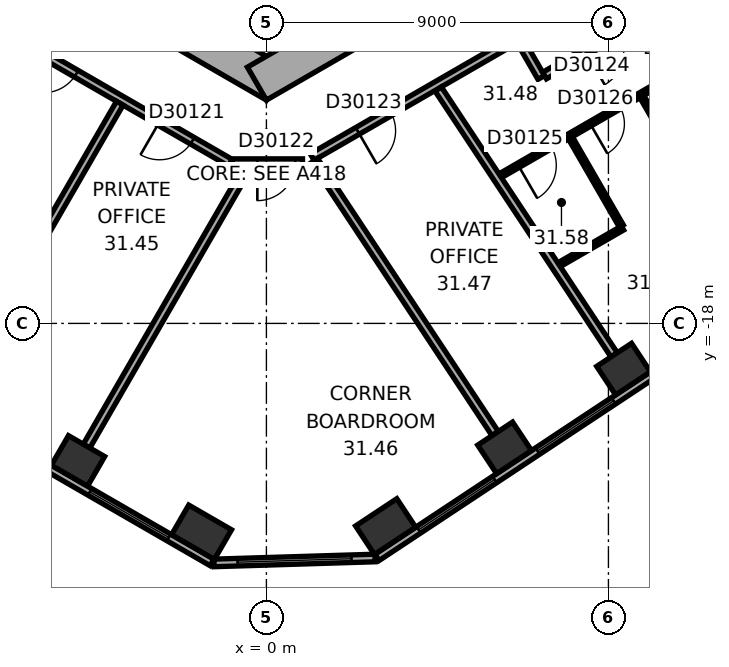
"""IFC4 building model, lengths in metres.
Left out: names, types, materials, properties, quantities, classifications, styles, units other than length and angle.
Written with IfcOpenShell. Run it as: python <this file> out.ifc"""

import sys

from ifc_helpers import new_model, si_unit, direction, frame, frame_2d, origin, origin_2d, place, context, subcontext, project, spatial, rectangle, extrude, element, fill, save


model = new_model("IFC4")
c1 = context("Model", 3, precision=1e-05, world=origin(), true_north=direction((0.0, 1.0)))
c2 = subcontext(c1, "Body", "Model", "MODEL_VIEW")
j1 = project(units=[si_unit("LENGTHUNIT", "METRE"), si_unit("PLANEANGLEUNIT", "RADIAN")], contexts=[c1])
p1 = place(None, origin())
s1 = spatial("IfcSite", under=j1, at=p1, CompositionType="ELEMENT")
p2 = place(p1, origin())
s2 = spatial("IfcBuilding", under=s1, at=p2, CompositionType="ELEMENT")
p3 = place(p2, frame((0.0, 0.0, 128.1)))
s3 = spatial("IfcBuildingStorey", under=s2, at=p3, CompositionType="ELEMENT", Elevation=128.1)
p4 = place(p3, frame((-4.958, -21.617, 0.0), z_axis=(0.0, 0.0, 1.0), x_axis=(0.866025403784, -0.5, 0.0)))
e1 = element("IfcColumn", 1, at=p4, inside=s3, PredefinedType="COLUMN", context=c2, shape_type="SweptSolid", body=[
    extrude(rectangle(XDim=1.1, YDim=0.9, at=origin_2d()), origin(), (0.0, 0.0, 1.0), 3.7),
])
for number, where, z_axis, x_axis in (
    (2, (-1.706, -23.494, 0.0), (0.0, 0.0, 1.0), (0.866, -0.5, 0.0)),
    (3, (3.137, -23.346, 0.0), (0.0, 0.0, 1.0), (0.834, 0.552, 0.0)),
):
    element("IfcColumn", number, at=place(p3, frame(where, z_axis=z_axis, x_axis=x_axis)), inside=s3, PredefinedType="COLUMN", context=c2, shape_type="SweptSolid", body=[
        extrude(rectangle(XDim=1.3, YDim=0.9, at=origin_2d()), origin(), (0.0, 0.0, 1.0), 3.7),
    ])
for number, where, z_axis, x_axis in (
    (4, (6.268, -21.274, 0.0), (0.0, 0.0, 1.0), (0.834, 0.552, 0.0)),
    (5, (9.398, -19.202, 0.0), (0.0, 0.0, 1.0), (0.834, 0.552, 0.0)),
):
    element("IfcColumn", number, at=place(p3, frame(where, z_axis=z_axis, x_axis=x_axis)), inside=s3, PredefinedType="COLUMN", context=c2, shape_type="SweptSolid", body=[
        extrude(rectangle(XDim=1.1, YDim=0.9, at=origin_2d()), origin(), (0.0, 0.0, 1.0), 3.7),
    ])
p5 = place(p3, frame((-10.25, -5.629, 0.0), z_axis=(0.0, 0.0, 1.0), x_axis=(0.866022616891, -0.50000482701, 0.0)))
e6 = element("IfcWall", 6, at=p5, inside=s3, PredefinedType="SHEAR", context=c2, shape_type="SweptSolid", body=[
    extrude(rectangle(XDim=12.125, YDim=1.0, at=frame_2d((6.062, 0.0))), origin(), (0.0, 0.0, 1.0), 3.7),
])
p6 = place(p5, frame((6.262, 0.0, 0.0)))
e7 = element("IfcOpeningElement", 7, at=p6, cuts=e6, PredefinedType="OPENING", context=c2, shape_type="SweptSolid", body=[
    extrude(rectangle(XDim=1.5, YDim=2.1, at=frame_2d((0.75, 1.05))), frame((0.0, 0.51, 0.0), z_axis=(0.0, -1.0, 0.0), x_axis=(1.0, 0.0, 0.0)), (0.0, 0.0, 1.0), 1.02),
])
p7 = place(p5, frame((1.812, 0.0, 0.0)))
e8 = element("IfcOpeningElement", 8, at=p7, cuts=e6, PredefinedType="OPENING", context=c2, shape_type="SweptSolid", body=[
    extrude(rectangle(XDim=0.9, YDim=2.1, at=frame_2d((0.45, 1.05))), frame((0.0, 0.51, 0.0), z_axis=(0.0, -1.0, 0.0), x_axis=(1.0, 0.0, 0.0)), (0.0, 0.0, 1.0), 1.02),
])
p8 = place(p5, frame((4.412, 0.0, 0.0)))
e9 = element("IfcOpeningElement", 9, at=p8, cuts=e6, PredefinedType="OPENING", context=c2, shape_type="SweptSolid", body=[
    extrude(rectangle(XDim=0.9, YDim=2.1, at=frame_2d((0.45, 1.05))), frame((0.0, 0.51, 0.0), z_axis=(0.0, -1.0, 0.0), x_axis=(1.0, 0.0, 0.0)), (0.0, 0.0, 1.0), 1.02),
])
p9 = place(p3, frame((-0.25, -11.691, 0.0), z_axis=(0.0, 0.0, 1.0), x_axis=(0.866022616891, 0.50000482701, 0.0)))
e10 = element("IfcWall", 10, at=p9, inside=s3, PredefinedType="SHEAR", context=c2, shape_type="SweptSolid", body=[
    extrude(rectangle(XDim=12.125, YDim=1.0, at=frame_2d((6.062, 0.0))), origin(), (0.0, 0.0, 1.0), 3.7),
])
p10 = place(p9, frame((4.012, 0.0, 0.0)))
e11 = element("IfcOpeningElement", 11, at=p10, cuts=e10, PredefinedType="OPENING", context=c2, shape_type="SweptSolid", body=[
    extrude(rectangle(XDim=0.9, YDim=2.1, at=frame_2d((0.45, 1.05))), frame((0.0, 0.51, 0.0), z_axis=(0.0, -1.0, 0.0), x_axis=(1.0, 0.0, 0.0)), (0.0, 0.0, 1.0), 1.02),
])
p11 = place(p9, frame((7.812, 0.0, 0.0)))
e12 = element("IfcOpeningElement", 12, at=p11, cuts=e10, PredefinedType="OPENING", context=c2, shape_type="SweptSolid", body=[
    extrude(rectangle(XDim=1.1, YDim=2.1, at=frame_2d((0.55, 1.05))), frame((0.0, 0.51, 0.0), z_axis=(0.0, -1.0, 0.0), x_axis=(1.0, 0.0, 0.0)), (0.0, 0.0, 1.0), 1.02),
])
p12 = place(p3, frame((-18.789, -14.267, 0.0), z_axis=(0.0, 0.0, 1.0), x_axis=(0.866023315909, -0.500003616288, 0.0)))
e13 = element("IfcWall", 13, at=p12, inside=s3, PredefinedType="STANDARD", context=c2, shape_type="SweptSolid", body=[
    extrude(rectangle(XDim=20.044, YDim=0.2, at=frame_2d((10.022, 0.0))), origin(), (0.0, 0.0, 1.0), 3.7),
])
p13 = place(p12, frame((1.314, 0.0, 0.9)))
e14 = element("IfcOpeningElement", 14, at=p13, cuts=e13, PredefinedType="OPENING", context=c2, shape_type="SweptSolid", body=[
    extrude(rectangle(XDim=2.4, YDim=2.0, at=frame_2d((1.2, 1.0))), frame((0.0, 0.11, 0.0), z_axis=(0.0, -1.0, 0.0), x_axis=(1.0, 0.0, 0.0)), (0.0, 0.0, 1.0), 0.22),
])
p14 = place(p12, frame((5.069, 0.0, 0.9)))
e15 = element("IfcOpeningElement", 15, at=p14, cuts=e13, PredefinedType="OPENING", context=c2, shape_type="SweptSolid", body=[
    extrude(rectangle(XDim=2.4, YDim=2.0, at=frame_2d((1.2, 1.0))), frame((0.0, 0.11, 0.0), z_axis=(0.0, -1.0, 0.0), x_axis=(1.0, 0.0, 0.0)), (0.0, 0.0, 1.0), 0.22),
])
p15 = place(p12, frame((8.823, 0.0, 0.9)))
e16 = element("IfcOpeningElement", 16, at=p15, cuts=e13, PredefinedType="OPENING", context=c2, shape_type="SweptSolid", body=[
    extrude(rectangle(XDim=2.4, YDim=2.0, at=frame_2d((1.2, 1.0))), frame((0.0, 0.11, 0.0), z_axis=(0.0, -1.0, 0.0), x_axis=(1.0, 0.0, 0.0)), (0.0, 0.0, 1.0), 0.22),
])
p16 = place(p12, frame((12.577, 0.0, 0.9)))
e17 = element("IfcOpeningElement", 17, at=p16, cuts=e13, PredefinedType="OPENING", context=c2, shape_type="SweptSolid", body=[
    extrude(rectangle(XDim=2.4, YDim=2.0, at=frame_2d((1.2, 1.0))), frame((0.0, 0.11, 0.0), z_axis=(0.0, -1.0, 0.0), x_axis=(1.0, 0.0, 0.0)), (0.0, 0.0, 1.0), 0.22),
])
p17 = place(p12, frame((16.331, 0.0, 0.9)))
e18 = element("IfcOpeningElement", 18, at=p17, cuts=e13, PredefinedType="OPENING", context=c2, shape_type="SweptSolid", body=[
    extrude(rectangle(XDim=2.4, YDim=2.0, at=frame_2d((1.2, 1.0))), frame((0.0, 0.11, 0.0), z_axis=(0.0, -1.0, 0.0), x_axis=(1.0, 0.0, 0.0)), (0.0, 0.0, 1.0), 0.22),
])
p18 = place(p3, frame((-1.378, -24.302, 0.0), z_axis=(0.0, 0.0, 1.0), x_axis=(0.999533857267, 0.030529791629, 0.0)))
e19 = element("IfcWall", 19, at=p18, inside=s3, PredefinedType="STANDARD", context=c2, shape_type="SweptSolid", body=[
    extrude(rectangle(XDim=4.238, YDim=0.2, at=frame_2d((2.119, 0.0))), origin(), (0.0, 0.0, 1.0), 3.7),
])
p19 = place(p18, frame((0.619, 0.0, 0.9)))
e20 = element("IfcOpeningElement", 20, at=p19, cuts=e19, PredefinedType="OPENING", context=c2, shape_type="SweptSolid", body=[
    extrude(rectangle(XDim=3.0, YDim=2.0, at=frame_2d((1.5, 1.0))), frame((0.0, 0.11, 0.0), z_axis=(0.0, -1.0, 0.0), x_axis=(1.0, 0.0, 0.0)), (0.0, 0.0, 1.0), 0.22),
])
p20 = place(p3, frame((2.911, -24.156, 0.0), z_axis=(0.0, 0.0, 1.0), x_axis=(0.833882163564, 0.551942512668, 0.0)))
e21 = element("IfcWall", 21, at=p20, inside=s3, PredefinedType="STANDARD", context=c2, shape_type="SweptSolid", body=[
    extrude(rectangle(XDim=20.044, YDim=0.2, at=frame_2d((10.022, 0.0))), origin(), (0.0, 0.0, 1.0), 3.7),
])
p21 = place(p20, frame((1.313, 0.0, 0.9)))
e22 = element("IfcOpeningElement", 22, at=p21, cuts=e21, PredefinedType="OPENING", context=c2, shape_type="SweptSolid", body=[
    extrude(rectangle(XDim=2.4, YDim=2.0, at=frame_2d((1.2, 1.0))), frame((0.0, 0.11, 0.0), z_axis=(0.0, -1.0, 0.0), x_axis=(1.0, 0.0, 0.0)), (0.0, 0.0, 1.0), 0.22),
])
p22 = place(p20, frame((5.067, 0.0, 0.9)))
e23 = element("IfcOpeningElement", 23, at=p22, cuts=e21, PredefinedType="OPENING", context=c2, shape_type="SweptSolid", body=[
    extrude(rectangle(XDim=2.4, YDim=2.0, at=frame_2d((1.2, 1.0))), frame((0.0, 0.11, 0.0), z_axis=(0.0, -1.0, 0.0), x_axis=(1.0, 0.0, 0.0)), (0.0, 0.0, 1.0), 0.22),
])
p23 = place(p20, frame((8.821, 0.0, 0.9)))
e24 = element("IfcOpeningElement", 24, at=p23, cuts=e21, PredefinedType="OPENING", context=c2, shape_type="SweptSolid", body=[
    extrude(rectangle(XDim=2.4, YDim=2.0, at=frame_2d((1.2, 1.0))), frame((0.0, 0.11, 0.0), z_axis=(0.0, -1.0, 0.0), x_axis=(1.0, 0.0, 0.0)), (0.0, 0.0, 1.0), 0.22),
])
p24 = place(p20, frame((12.575, 0.0, 0.9)))
e25 = element("IfcOpeningElement", 25, at=p24, cuts=e21, PredefinedType="OPENING", context=c2, shape_type="SweptSolid", body=[
    extrude(rectangle(XDim=2.4, YDim=2.0, at=frame_2d((1.2, 1.0))), frame((0.0, 0.11, 0.0), z_axis=(0.0, -1.0, 0.0), x_axis=(1.0, 0.0, 0.0)), (0.0, 0.0, 1.0), 0.22),
])
p25 = place(p20, frame((16.329, 0.0, 0.9)))
e26 = element("IfcOpeningElement", 26, at=p25, cuts=e21, PredefinedType="OPENING", context=c2, shape_type="SweptSolid", body=[
    extrude(rectangle(XDim=2.4, YDim=2.0, at=frame_2d((1.2, 1.0))), frame((0.0, 0.11, 0.0), z_axis=(0.0, -1.0, 0.0), x_axis=(1.0, 0.0, 0.0)), (0.0, 0.0, 1.0), 0.22),
])
p26 = place(p3, frame((-11.415, -7.728, 0.0), z_axis=(0.0, 0.0, 1.0), x_axis=(0.866022749921, -0.500004596598, 0.0)))
e27 = element("IfcWall", 27, at=p26, inside=s3, PredefinedType="PARTITIONING", context=c2, shape_type="SweptSolid", body=[
    extrude(rectangle(XDim=12.084, YDim=0.2, at=frame_2d((6.042, 0.0))), origin(), (0.0, 0.0, 1.0), 3.42),
])
p27 = place(p26, frame((2.652, 0.0, 0.0)))
e28 = element("IfcOpeningElement", 28, at=p27, cuts=e27, PredefinedType="OPENING", context=c2, shape_type="SweptSolid", body=[
    extrude(rectangle(XDim=1.0, YDim=2.1, at=frame_2d((0.5, 1.05))), frame((0.0, 0.11, 0.0), z_axis=(0.0, -1.0, 0.0), x_axis=(1.0, 0.0, 0.0)), (0.0, 0.0, 1.0), 0.22),
])
p28 = place(p26, frame((6.406, 0.0, 0.0)))
e29 = element("IfcOpeningElement", 29, at=p28, cuts=e27, PredefinedType="OPENING", context=c2, shape_type="SweptSolid", body=[
    extrude(rectangle(XDim=1.0, YDim=2.1, at=frame_2d((0.5, 1.05))), frame((0.0, 0.11, 0.0), z_axis=(0.0, -1.0, 0.0), x_axis=(1.0, 0.0, 0.0)), (0.0, 0.0, 1.0), 0.22),
])
p29 = place(p26, frame((9.934, 0.0, 0.0)))
e30 = element("IfcOpeningElement", 30, at=p29, cuts=e27, PredefinedType="OPENING", context=c2, shape_type="SweptSolid", body=[
    extrude(rectangle(XDim=1.0, YDim=2.1, at=frame_2d((0.5, 1.05))), frame((0.0, 0.11, 0.0), z_axis=(0.0, -1.0, 0.0), x_axis=(1.0, 0.0, 0.0)), (0.0, 0.0, 1.0), 0.22),
])
p30 = place(p3, frame((-7.984, -19.351, 0.0), z_axis=(0.0, 0.0, 1.0), x_axis=(0.500009360108, 0.866019999656, 0.0)))
e31 = element("IfcWall", 31, at=p30, inside=s3, PredefinedType="PARTITIONING", context=c2, shape_type="SweptSolid", body=[
    extrude(rectangle(XDim=8.25, YDim=0.2, at=frame_2d((4.125, 0.0))), origin(), (0.0, 0.0, 1.0), 3.42),
])
p31 = place(p3, frame((-4.732, -21.228, 0.0), z_axis=(0.0, 0.0, 1.0), x_axis=(0.500000843414, 0.866024916838, 0.0)))
e32 = element("IfcWall", 32, at=p31, inside=s3, PredefinedType="PARTITIONING", context=c2, shape_type="SweptSolid", body=[
    extrude(rectangle(XDim=8.452, YDim=0.2, at=frame_2d((4.226, 0.0))), origin(), (0.0, 0.0, 1.0), 3.42),
])
p32 = place(p3, frame((-0.91, -13.77, 0.0), z_axis=(0.0, 0.0, 1.0), x_axis=(1.0, 0.0, 0.0)))
e33 = element("IfcWall", 33, at=p32, inside=s3, PredefinedType="PARTITIONING", context=c2, shape_type="SweptSolid", body=[
    extrude(rectangle(XDim=1.86, YDim=0.2, at=frame_2d((0.93, 0.0))), origin(), (0.0, 0.0, 1.0), 3.42),
])
p33 = place(p32, frame((0.672, 0.0, 0.0)))
e34 = element("IfcOpeningElement", 34, at=p33, cuts=e33, PredefinedType="OPENING", context=c2, shape_type="SweptSolid", body=[
    extrude(rectangle(XDim=1.0, YDim=2.1, at=frame_2d((0.5, 1.05))), frame((0.0, 0.11, 0.0), z_axis=(0.0, -1.0, 0.0), x_axis=(1.0, 0.0, 0.0)), (0.0, 0.0, 1.0), 0.22),
])
p34 = place(p3, frame((1.204, -13.623, 0.0), z_axis=(0.0, 0.0, 1.0), x_axis=(0.866031867142, 0.49998880497, 0.0)))
e35 = element("IfcWall", 35, at=p34, inside=s3, PredefinedType="PARTITIONING", context=c2, shape_type="SweptSolid", body=[
    extrude(rectangle(XDim=6.268, YDim=0.2, at=frame_2d((3.134, 0.0))), origin(), (0.0, 0.0, 1.0), 3.42),
])
p35 = place(p34, frame((1.381, 0.0, 0.0)))
e36 = element("IfcOpeningElement", 36, at=p35, cuts=e35, PredefinedType="OPENING", context=c2, shape_type="SweptSolid", body=[
    extrude(rectangle(XDim=1.0, YDim=2.1, at=frame_2d((0.5, 1.05))), frame((0.0, 0.11, 0.0), z_axis=(0.0, -1.0, 0.0), x_axis=(1.0, 0.0, 0.0)), (0.0, 0.0, 1.0), 0.22),
])
p36 = place(p3, frame((6.02, -20.899, 0.0), z_axis=(0.0, 0.0, 1.0), x_axis=(-0.551943990108, 0.833881185651, 0.0)))
e37 = element("IfcWall", 37, at=p36, inside=s3, PredefinedType="PARTITIONING", context=c2, shape_type="SweptSolid", body=[
    extrude(rectangle(XDim=8.615, YDim=0.2, at=frame_2d((4.308, 0.0))), origin(), (0.0, 0.0, 1.0), 3.42),
])
p37 = place(p3, frame((6.152, -14.116, 0.0), z_axis=(0.0, 0.0, 1.0), x_axis=(0.866026788224, 0.499997602072, 0.0)))
e38 = element("IfcWall", 38, at=p37, inside=s3, PredefinedType="PARTITIONING", context=c2, shape_type="SweptSolid", body=[
    extrude(rectangle(XDim=7.322, YDim=0.12, at=frame_2d((3.661, 0.0))), origin(), (0.0, 0.0, 1.0), 3.42),
])
p38 = place(p37, frame((0.55, 0.0, 0.0)))
e39 = element("IfcOpeningElement", 39, at=p38, cuts=e38, PredefinedType="OPENING", context=c2, shape_type="SweptSolid", body=[
    extrude(rectangle(XDim=1.0, YDim=2.1, at=frame_2d((0.5, 1.05))), frame((0.0, 0.07, 0.0), z_axis=(0.0, -1.0, 0.0), x_axis=(1.0, 0.0, 0.0)), (0.0, 0.0, 1.0), 0.14),
])
p39 = place(p37, frame((2.736, 0.0, 0.0)))
e40 = element("IfcOpeningElement", 40, at=p39, cuts=e38, PredefinedType="OPENING", context=c2, shape_type="SweptSolid", body=[
    extrude(rectangle(XDim=0.9, YDim=2.1, at=frame_2d((0.45, 1.05))), frame((0.0, 0.07, 0.0), z_axis=(0.0, -1.0, 0.0), x_axis=(1.0, 0.0, 0.0)), (0.0, 0.0, 1.0), 0.14),
])
p40 = place(p37, frame((5.347, 0.0, 0.0)))
e41 = element("IfcOpeningElement", 41, at=p40, cuts=e38, PredefinedType="OPENING", context=c2, shape_type="SweptSolid", body=[
    extrude(rectangle(XDim=0.9, YDim=2.1, at=frame_2d((0.45, 1.05))), frame((0.0, 0.07, 0.0), z_axis=(0.0, -1.0, 0.0), x_axis=(1.0, 0.0, 0.0)), (0.0, 0.0, 1.0), 0.14),
])
p41 = place(p3, frame((6.682, -10.576, 0.0), z_axis=(0.0, 0.0, 1.0), x_axis=(0.499978356969, -0.866037899034, 0.0)))
e42 = element("IfcWall", 42, at=p41, inside=s3, PredefinedType="PARTITIONING", context=c2, shape_type="SweptSolid", body=[
    extrude(rectangle(XDim=1.101, YDim=0.2, at=frame_2d((0.551, 0.0))), origin(), (0.0, 0.0, 1.0), 3.42),
])
p42 = place(p3, frame((7.319, -11.479, 0.0), z_axis=(0.0, 0.0, 1.0), x_axis=(0.866038154057, 0.49997791523, 0.0)))
e43 = element("IfcWall", 43, at=p42, inside=s3, PredefinedType="PARTITIONING", context=c2, shape_type="SweptSolid", body=[
    extrude(rectangle(XDim=3.502, YDim=0.2, at=frame_2d((1.751, 0.0))), origin(), (0.0, 0.0, 1.0), 3.42),
])
p43 = place(p42, frame((1.251, 0.0, 0.0)))
e44 = element("IfcOpeningElement", 44, at=p43, cuts=e43, PredefinedType="OPENING", context=c2, shape_type="SweptSolid", body=[
    extrude(rectangle(XDim=1.0, YDim=2.1, at=frame_2d((0.5, 1.05))), frame((0.0, 0.11, 0.0), z_axis=(0.0, -1.0, 0.0), x_axis=(1.0, 0.0, 0.0)), (0.0, 0.0, 1.0), 0.22),
])
p44 = place(p3, frame((7.7, -16.456, 0.0), z_axis=(0.0, 0.0, 1.0), x_axis=(0.86603803935, 0.499978113919, 0.0)))
e45 = element("IfcWall", 45, at=p44, inside=s3, PredefinedType="PARTITIONING", context=c2, shape_type="SweptSolid", body=[
    extrude(rectangle(XDim=1.929, YDim=0.12, at=frame_2d((0.964, 0.0))), origin(), (0.0, 0.0, 1.0), 3.42),
])
p45 = place(p3, frame((9.15, -18.827, 0.0), z_axis=(0.0, 0.0, 1.0), x_axis=(-0.551942527453, 0.833882153777, 0.0)))
e46 = element("IfcWall", 46, at=p45, inside=s3, PredefinedType="PARTITIONING", context=c2, shape_type="SweptSolid", body=[
    extrude(rectangle(XDim=8.386, YDim=0.2, at=frame_2d((4.193, 0.0))), origin(), (0.0, 0.0, 1.0), 2.87),
])
p46 = place(p3, frame((9.34, -15.439, 0.0), z_axis=(0.0, 0.0, 1.0), x_axis=(-0.500048396672, 0.86599746015, 0.0)))
e47 = element("IfcWall", 47, at=p46, inside=s3, PredefinedType="PARTITIONING", context=c2, shape_type="SweptSolid", body=[
    extrude(rectangle(XDim=2.68, YDim=0.12, at=frame_2d((1.34, 0.0))), origin(), (0.0, 0.0, 1.0), 3.42),
])
p47 = place(p3, frame((12.517, -16.599, 0.0), z_axis=(0.0, 0.0, 1.0), x_axis=(-0.500013727357, 0.866017478146, 0.0)))
e48 = element("IfcWall", 48, at=p47, inside=s3, PredefinedType="PARTITIONING", context=c2, shape_type="SweptSolid", body=[
    extrude(rectangle(XDim=5.272, YDim=0.12, at=frame_2d((2.636, 0.0))), origin(), (0.0, 0.0, 1.0), 3.42),
])
p48 = place(p17, origin())
e49 = element("IfcWindow", 49, at=p48, inside=s3, PartitioningType="SINGLE_PANEL", PredefinedType="WINDOW", context=c2, shape_type="SweptSolid", body=[
    extrude(rectangle(XDim=2.4, YDim=2.0, at=frame_2d((1.2, 1.0))), frame((0.0, 0.03, 0.0), z_axis=(0.0, -1.0, 0.0), x_axis=(1.0, 0.0, 0.0)), (0.0, 0.0, 1.0), 0.06),
])
fill(e18, e49)
p49 = place(p19, origin())
e50 = element("IfcWindow", 50, at=p49, inside=s3, PartitioningType="SINGLE_PANEL", PredefinedType="WINDOW", context=c2, shape_type="SweptSolid", body=[
    extrude(rectangle(XDim=3.0, YDim=2.0, at=frame_2d((1.5, 1.0))), frame((0.0, 0.03, 0.0), z_axis=(0.0, -1.0, 0.0), x_axis=(1.0, 0.0, 0.0)), (0.0, 0.0, 1.0), 0.06),
])
fill(e20, e50)
p50 = place(p21, origin())
e51 = element("IfcWindow", 51, at=p50, inside=s3, PartitioningType="SINGLE_PANEL", PredefinedType="WINDOW", context=c2, shape_type="SweptSolid", body=[
    extrude(rectangle(XDim=2.4, YDim=2.0, at=frame_2d((1.2, 1.0))), frame((0.0, 0.03, 0.0), z_axis=(0.0, -1.0, 0.0), x_axis=(1.0, 0.0, 0.0)), (0.0, 0.0, 1.0), 0.06),
])
fill(e22, e51)
p51 = place(p22, origin())
e52 = element("IfcWindow", 52, at=p51, inside=s3, PartitioningType="SINGLE_PANEL", PredefinedType="WINDOW", context=c2, shape_type="SweptSolid", body=[
    extrude(rectangle(XDim=2.4, YDim=2.0, at=frame_2d((1.2, 1.0))), frame((0.0, 0.03, 0.0), z_axis=(0.0, -1.0, 0.0), x_axis=(1.0, 0.0, 0.0)), (0.0, 0.0, 1.0), 0.06),
])
fill(e23, e52)
p52 = place(p28, origin())
e53 = element("IfcDoor", 53, at=p52, inside=s3, OperationType="SINGLE_SWING_LEFT", PredefinedType="DOOR", context=c2, shape_type="SweptSolid", body=[
    extrude(rectangle(XDim=1.0, YDim=2.1, at=frame_2d((0.5, 1.05))), frame((0.0, 0.025, 0.0), z_axis=(0.0, -1.0, 0.0), x_axis=(1.0, 0.0, 0.0)), (0.0, 0.0, 1.0), 0.05),
])
fill(e29, e53)
p53 = place(p29, origin())
e54 = element("IfcDoor", 54, at=p53, inside=s3, OperationType="SINGLE_SWING_LEFT", PredefinedType="DOOR", context=c2, shape_type="SweptSolid", body=[
    extrude(rectangle(XDim=1.0, YDim=2.1, at=frame_2d((0.5, 1.05))), frame((0.0, 0.025, 0.0), z_axis=(0.0, -1.0, 0.0), x_axis=(1.0, 0.0, 0.0)), (0.0, 0.0, 1.0), 0.05),
])
fill(e30, e54)
p54 = place(p33, origin())
e55 = element("IfcDoor", 55, at=p54, inside=s3, OperationType="SINGLE_SWING_LEFT", PredefinedType="DOOR", context=c2, shape_type="SweptSolid", body=[
    extrude(rectangle(XDim=1.0, YDim=2.1, at=frame_2d((0.5, 1.05))), frame((0.0, 0.025, 0.0), z_axis=(0.0, -1.0, 0.0), x_axis=(1.0, 0.0, 0.0)), (0.0, 0.0, 1.0), 0.05),
])
fill(e34, e55)
p55 = place(p35, origin())
e56 = element("IfcDoor", 56, at=p55, inside=s3, OperationType="SINGLE_SWING_LEFT", PredefinedType="DOOR", context=c2, shape_type="SweptSolid", body=[
    extrude(rectangle(XDim=1.0, YDim=2.1, at=frame_2d((0.5, 1.05))), frame((0.0, 0.025, 0.0), z_axis=(0.0, -1.0, 0.0), x_axis=(1.0, 0.0, 0.0)), (0.0, 0.0, 1.0), 0.05),
])
fill(e36, e56)
p56 = place(p38, origin())
e57 = element("IfcDoor", 57, at=p56, inside=s3, OperationType="SINGLE_SWING_LEFT", PredefinedType="DOOR", context=c2, shape_type="SweptSolid", body=[
    extrude(rectangle(XDim=1.0, YDim=2.1, at=frame_2d((0.5, 1.05))), frame((0.0, 0.025, 0.0), z_axis=(0.0, -1.0, 0.0), x_axis=(1.0, 0.0, 0.0)), (0.0, 0.0, 1.0), 0.05),
])
fill(e39, e57)
p57 = place(p39, origin())
e58 = element("IfcDoor", 58, at=p57, inside=s3, OperationType="SINGLE_SWING_LEFT", PredefinedType="DOOR", context=c2, shape_type="SweptSolid", body=[
    extrude(rectangle(XDim=0.9, YDim=2.1, at=frame_2d((0.45, 1.05))), frame((0.0, 0.025, 0.0), z_axis=(0.0, -1.0, 0.0), x_axis=(1.0, 0.0, 0.0)), (0.0, 0.0, 1.0), 0.05),
])
fill(e40, e58)
save(model, sys.argv[1])
